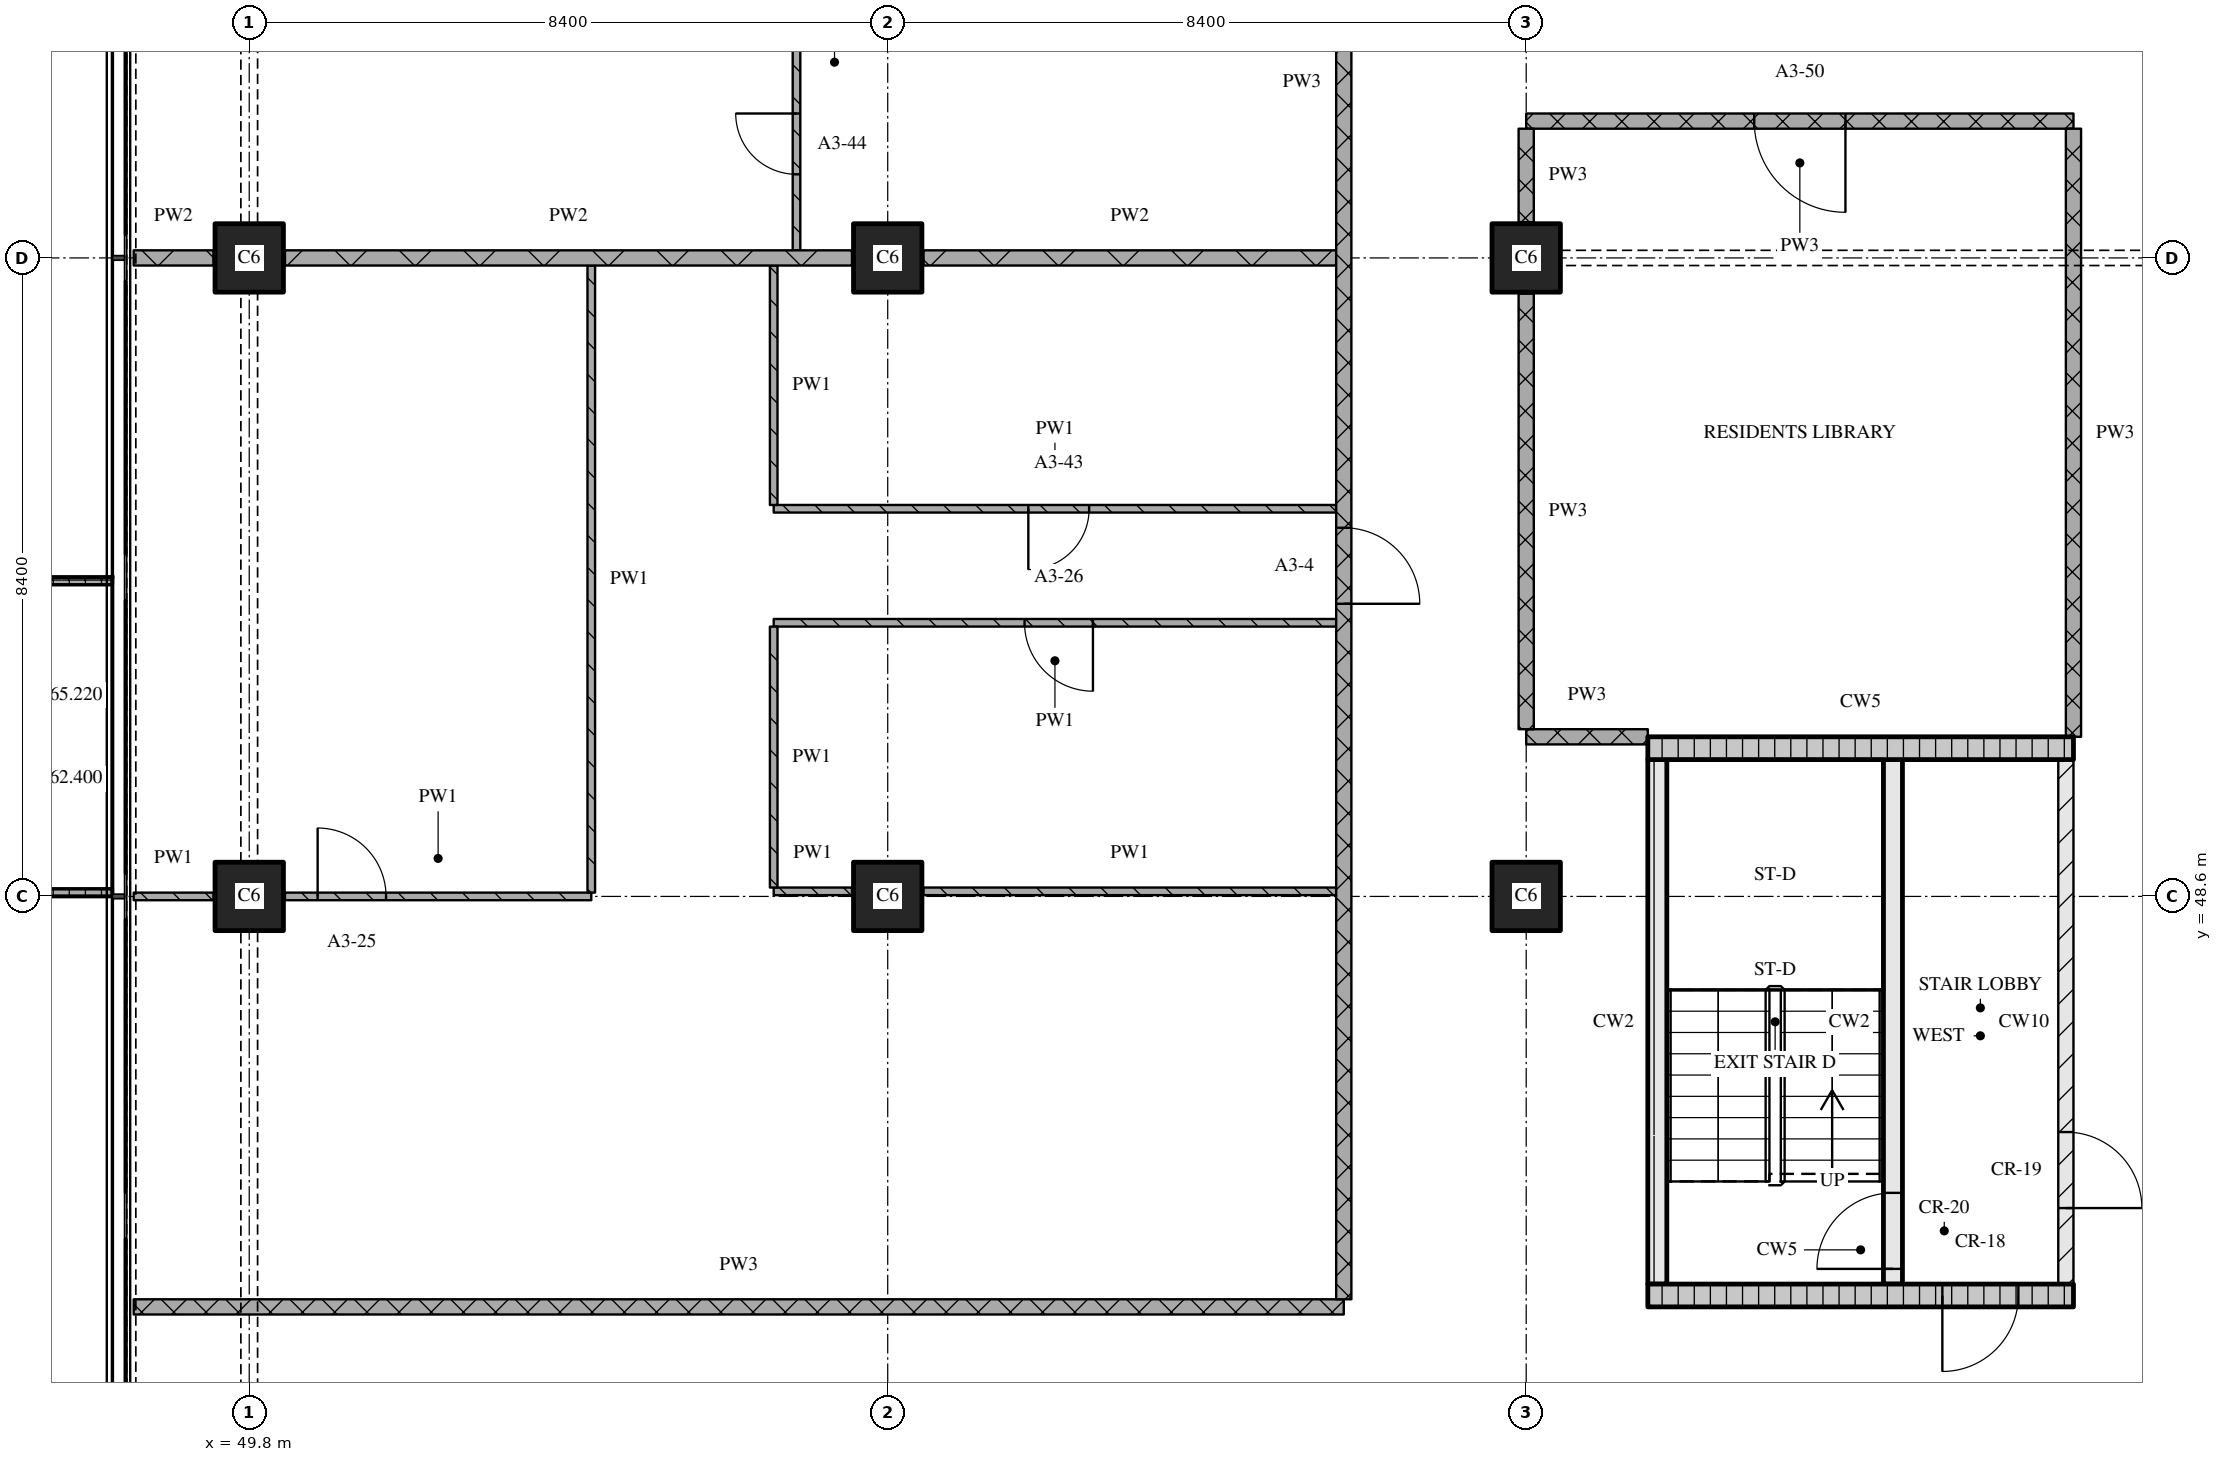
"""IFC4 building model, lengths in metres.
Left out: names, types, materials, properties, quantities, classifications, styles, units other than length and angle.
Written with IfcOpenShell. Run it as: python <this file> out.ifc"""

import sys

from ifc_helpers import new_model, si_unit, direction, frame, frame_2d, origin, origin_2d, place, context, subcontext, project, spatial, polyline, rectangle, outline, extrude, element, fill, save


model = new_model("IFC4")
c1 = context("Model", 3, precision=1e-05, world=origin(), true_north=direction((0.0, 1.0)))
c2 = subcontext(c1, "Body", "Model", "MODEL_VIEW")
j1 = project(units=[si_unit("LENGTHUNIT", "METRE"), si_unit("PLANEANGLEUNIT", "RADIAN")], contexts=[c1])
p1 = place(None, origin())
s1 = spatial("IfcSite", under=j1, at=p1, CompositionType="ELEMENT")
p2 = place(p1, origin())
s2 = spatial("IfcBuilding", under=s1, at=p2, CompositionType="ELEMENT")
p3 = place(p2, frame((0.0, 0.0, 62.4)))
s3 = spatial("IfcBuildingStorey", under=s2, at=p3, CompositionType="ELEMENT", Elevation=62.4)
for number, where, z_axis, x_axis in (
    (1, (49.8, 48.6, 0.0), (0.0, 0.0, 1.0), (1.0, 0.0, 0.0)),
    (2, (49.8, 57.0, 0.0), (0.0, 0.0, 1.0), (1.0, 0.0, 0.0)),
    (3, (58.2, 48.6, 0.0), (0.0, 0.0, 1.0), (1.0, 0.0, 0.0)),
    (4, (58.2, 57.0, 0.0), (0.0, 0.0, 1.0), (1.0, 0.0, 0.0)),
    (5, (66.6, 48.6, 0.0), (0.0, 0.0, 1.0), (1.0, 0.0, 0.0)),
    (6, (66.6, 57.0, 0.0), (0.0, 0.0, 1.0), (1.0, 0.0, 0.0)),
):
    element("IfcColumn", number, at=place(p3, frame(where, z_axis=z_axis, x_axis=x_axis)), inside=s3, PredefinedType="COLUMN", context=c2, shape_type="SweptSolid", body=[
        extrude(rectangle(XDim=0.9, YDim=0.9, at=origin_2d()), origin(), (0.0, 0.0, 1.0), 3.6),
    ])
p4 = place(p3, origin())
e7 = element("IfcWall", 7, at=p4, inside=s3, PredefinedType="SOLIDWALL", context=c2, shape_type="SweptSolid", body=[
    extrude(outline(polyline([(48.0, 52.8), (48.0, 52.7), (46.367, 52.7), (46.367, 48.7), (48.0, 48.7), (48.0, 48.6), (46.267, 48.6), (46.267, 52.8), (48.0, 52.8)])), origin(), (0.0, 0.0, 1.0), 1.0),
])
p5 = place(p3, frame((68.2, 43.35, 0.0), z_axis=(0.0, 0.0, 1.0), x_axis=(1.0, 0.0, 0.0)))
e8 = element("IfcWall", 8, at=p5, inside=s3, PredefinedType="SOLIDWALL", context=c2, shape_type="SweptSolid", body=[
    extrude(rectangle(XDim=5.6, YDim=0.3, at=frame_2d((2.8, 0.0))), origin(), (0.0, 0.0, 1.0), 3.32),
])
p6 = place(p5, frame((3.875, 0.0, 0.0)))
e9 = element("IfcOpeningElement", 9, at=p6, cuts=e8, PredefinedType="OPENING", context=c2, shape_type="SweptSolid", body=[
    extrude(rectangle(XDim=1.0, YDim=2.1, at=frame_2d((0.5, 1.05))), frame((0.0, 0.16, 0.0), z_axis=(0.0, -1.0, 0.0), x_axis=(1.0, 0.0, 0.0)), (0.0, 0.0, 1.0), 0.32),
])
p7 = place(p3, frame((68.325, 43.5, 0.0), z_axis=(0.0, 0.0, 1.0), x_axis=(0.0, 1.0, 0.0)))
e10 = element("IfcWall", 10, at=p7, inside=s3, PredefinedType="SOLIDWALL", context=c2, shape_type="SweptSolid", body=[
    extrude(rectangle(XDim=6.9, YDim=0.25, at=frame_2d((3.45, 0.0))), origin(), (0.0, 0.0, 1.0), 3.32),
])
p8 = place(p3, frame((71.425, 43.5, 0.0), z_axis=(0.0, 0.0, 1.0), x_axis=(0.0, 1.0, 0.0)))
e11 = element("IfcWall", 11, at=p8, inside=s3, PredefinedType="SOLIDWALL", context=c2, shape_type="SweptSolid", body=[
    extrude(rectangle(XDim=6.9, YDim=0.25, at=frame_2d((3.45, 0.0))), origin(), (0.0, 0.0, 1.0), 3.32),
])
p9 = place(p8, frame((0.2, 0.0, 0.0)))
e12 = element("IfcOpeningElement", 12, at=p9, cuts=e11, PredefinedType="OPENING", context=c2, shape_type="SweptSolid", body=[
    extrude(rectangle(XDim=1.0, YDim=2.1, at=frame_2d((0.5, 1.05))), frame((0.0, 0.135, 0.0), z_axis=(0.0, -1.0, 0.0), x_axis=(1.0, 0.0, 0.0)), (0.0, 0.0, 1.0), 0.27),
])
p10 = place(p3, frame((73.7, 43.5, 0.0), z_axis=(0.0, 0.0, 1.0), x_axis=(0.0, 1.0, 0.0)))
e13 = element("IfcWall", 13, at=p10, inside=s3, PredefinedType="PARTITIONING", context=c2, shape_type="SweptSolid", body=[
    extrude(rectangle(XDim=6.9, YDim=0.2, at=frame_2d((3.45, 0.0))), origin(), (0.0, 0.0, 1.0), 3.32),
])
p11 = place(p10, frame((1.0, 0.0, 0.0)))
e14 = element("IfcOpeningElement", 14, at=p11, cuts=e13, PredefinedType="OPENING", context=c2, shape_type="SweptSolid", body=[
    extrude(rectangle(XDim=1.0, YDim=2.1, at=frame_2d((0.5, 1.05))), frame((0.0, 0.11, 0.0), z_axis=(0.0, -1.0, 0.0), x_axis=(1.0, 0.0, 0.0)), (0.0, 0.0, 1.0), 0.22),
])
p12 = place(p3, frame((68.2, 50.55, 0.0), z_axis=(0.0, 0.0, 1.0), x_axis=(1.0, 0.0, 0.0)))
e15 = element("IfcWall", 15, at=p12, inside=s3, PredefinedType="SOLIDWALL", context=c2, shape_type="SweptSolid", body=[
    extrude(rectangle(XDim=5.6, YDim=0.3, at=frame_2d((2.8, 0.0))), origin(), (0.0, 0.0, 1.0), 3.32),
])
p13 = place(p3, frame((48.28, 43.2, 0.0), z_axis=(0.0, 0.0, 1.0), x_axis=(1.0, 0.0, 0.0)))
e16 = element("IfcWall", 16, at=p13, inside=s3, PredefinedType="PARTITIONING", context=c2, shape_type="SweptSolid", body=[
    extrude(rectangle(XDim=15.92, YDim=0.2, at=frame_2d((7.96, 0.0))), origin(), (0.0, 0.0, 1.0), 3.32),
])
p14 = place(p3, frame((48.28, 48.6, 0.0), z_axis=(0.0, 0.0, 1.0), x_axis=(1.0, 0.0, 0.0)))
e17 = element("IfcWall", 17, at=p14, inside=s3, PredefinedType="PARTITIONING", context=c2, shape_type="SweptSolid", body=[
    extrude(rectangle(XDim=1.05, YDim=0.1, at=frame_2d((0.525, 0.0))), origin(), (0.0, 0.0, 1.0), 3.32),
])
p15 = place(p3, frame((50.27, 48.6, 0.0), z_axis=(0.0, 0.0, 1.0), x_axis=(1.0, 0.0, 0.0)))
e18 = element("IfcWall", 18, at=p15, inside=s3, PredefinedType="PARTITIONING", context=c2, shape_type="SweptSolid", body=[
    extrude(rectangle(XDim=4.03, YDim=0.1, at=frame_2d((2.015, 0.0))), origin(), (0.0, 0.0, 1.0), 3.32),
])
p16 = place(p15, frame((0.43, 0.0, 0.0)))
e19 = element("IfcOpeningElement", 19, at=p16, cuts=e18, PredefinedType="OPENING", context=c2, shape_type="SweptSolid", body=[
    extrude(rectangle(XDim=0.9, YDim=2.1, at=frame_2d((0.45, 1.05))), frame((0.0, 0.06, 0.0), z_axis=(0.0, -1.0, 0.0), x_axis=(1.0, 0.0, 0.0)), (0.0, 0.0, 1.0), 0.12),
])
p17 = place(p3, frame((56.7, 48.667, 0.0), z_axis=(0.0, 0.0, 1.0), x_axis=(1.0, 0.0, 0.0)))
e20 = element("IfcWall", 20, at=p17, inside=s3, PredefinedType="PARTITIONING", context=c2, shape_type="SweptSolid", body=[
    extrude(rectangle(XDim=1.03, YDim=0.1, at=frame_2d((0.515, 0.0))), origin(), (0.0, 0.0, 1.0), 3.32),
])
p18 = place(p3, frame((58.67, 48.667, 0.0), z_axis=(0.0, 0.0, 1.0), x_axis=(1.0, 0.0, 0.0)))
e21 = element("IfcWall", 21, at=p18, inside=s3, PredefinedType="PARTITIONING", context=c2, shape_type="SweptSolid", body=[
    extrude(rectangle(XDim=5.43, YDim=0.1, at=frame_2d((2.715, 0.0))), origin(), (0.0, 0.0, 1.0), 3.32),
])
p19 = place(p3, frame((66.6, 50.7, 0.0), z_axis=(0.0, 0.0, 1.0), x_axis=(1.0, 0.0, 0.0)))
e22 = element("IfcWall", 22, at=p19, inside=s3, PredefinedType="PARTITIONING", context=c2, shape_type="SweptSolid", body=[
    extrude(rectangle(XDim=1.6, YDim=0.2, at=frame_2d((0.8, 0.0))), origin(), (0.0, 0.0, 1.0), 3.32),
])
p20 = place(p3, frame((64.1, 52.2, 0.0), z_axis=(0.0, 0.0, 1.0), x_axis=(-1.0, 0.0, 0.0)))
e23 = element("IfcWall", 23, at=p20, inside=s3, PredefinedType="PARTITIONING", context=c2, shape_type="SweptSolid", body=[
    extrude(rectangle(XDim=7.4, YDim=0.1, at=frame_2d((3.7, 0.0))), origin(), (0.0, 0.0, 1.0), 3.32),
])
p21 = place(p20, frame((3.2, 0.0, 0.0)))
e24 = element("IfcOpeningElement", 24, at=p21, cuts=e23, PredefinedType="OPENING", context=c2, shape_type="SweptSolid", body=[
    extrude(rectangle(XDim=0.9, YDim=2.1, at=frame_2d((0.45, 1.05))), frame((0.0, 0.06, 0.0), z_axis=(0.0, -1.0, 0.0), x_axis=(1.0, 0.0, 0.0)), (0.0, 0.0, 1.0), 0.12),
])
p22 = place(p3, frame((56.7, 53.7, 0.0), z_axis=(0.0, 0.0, 1.0), x_axis=(1.0, 0.0, 0.0)))
e25 = element("IfcWall", 25, at=p22, inside=s3, PredefinedType="PARTITIONING", context=c2, shape_type="SweptSolid", body=[
    extrude(rectangle(XDim=7.4, YDim=0.1, at=frame_2d((3.7, 0.0))), origin(), (0.0, 0.0, 1.0), 3.32),
])
p23 = place(p22, frame((3.35, 0.0, 0.0)))
e26 = element("IfcOpeningElement", 26, at=p23, cuts=e25, PredefinedType="OPENING", context=c2, shape_type="SweptSolid", body=[
    extrude(rectangle(XDim=0.8, YDim=2.1, at=frame_2d((0.4, 1.05))), frame((0.0, 0.06, 0.0), z_axis=(0.0, -1.0, 0.0), x_axis=(1.0, 0.0, 0.0)), (0.0, 0.0, 1.0), 0.12),
])
p24 = place(p3, frame((48.28, 57.0, 0.0), z_axis=(0.0, 0.0, 1.0), x_axis=(1.0, 0.0, 0.0)))
e27 = element("IfcWall", 27, at=p24, inside=s3, PredefinedType="PARTITIONING", context=c2, shape_type="SweptSolid", body=[
    extrude(rectangle(XDim=1.05, YDim=0.2, at=frame_2d((0.525, 0.0))), origin(), (0.0, 0.0, 1.0), 3.32),
])
p25 = place(p3, frame((50.27, 57.0, 0.0), z_axis=(0.0, 0.0, 1.0), x_axis=(1.0, 0.0, 0.0)))
e28 = element("IfcWall", 28, at=p25, inside=s3, PredefinedType="PARTITIONING", context=c2, shape_type="SweptSolid", body=[
    extrude(rectangle(XDim=7.46, YDim=0.2, at=frame_2d((3.73, 0.0))), origin(), (0.0, 0.0, 1.0), 3.32),
])
p26 = place(p3, frame((58.67, 57.0, 0.0), z_axis=(0.0, 0.0, 1.0), x_axis=(1.0, 0.0, 0.0)))
e29 = element("IfcWall", 29, at=p26, inside=s3, PredefinedType="PARTITIONING", context=c2, shape_type="SweptSolid", body=[
    extrude(rectangle(XDim=5.43, YDim=0.2, at=frame_2d((2.715, 0.0))), origin(), (0.0, 0.0, 1.0), 3.32),
])
p27 = place(p3, frame((73.8, 58.8, 0.0), z_axis=(0.0, 0.0, 1.0), x_axis=(-1.0, 0.0, 0.0)))
e30 = element("IfcWall", 30, at=p27, inside=s3, PredefinedType="PARTITIONING", context=c2, shape_type="SweptSolid", body=[
    extrude(rectangle(XDim=7.2, YDim=0.2, at=frame_2d((3.6, 0.0))), origin(), (0.0, 0.0, 1.0), 3.32),
])
p28 = place(p27, frame((3.0, 0.0, 0.0)))
e31 = element("IfcOpeningElement", 31, at=p28, cuts=e30, PredefinedType="OPENING", context=c2, shape_type="SweptSolid", body=[
    extrude(rectangle(XDim=1.2, YDim=2.1, at=frame_2d((0.6, 1.05))), frame((0.0, 0.11, 0.0), z_axis=(0.0, -1.0, 0.0), x_axis=(1.0, 0.0, 0.0)), (0.0, 0.0, 1.0), 0.22),
])
p29 = place(p3, frame((54.3, 56.9, 0.0), z_axis=(0.0, 0.0, 1.0), x_axis=(0.0, -1.0, 0.0)))
e32 = element("IfcWall", 32, at=p29, inside=s3, PredefinedType="PARTITIONING", context=c2, shape_type="SweptSolid", body=[
    extrude(rectangle(XDim=8.25, YDim=0.1, at=frame_2d((4.125, 0.0))), origin(), (0.0, 0.0, 1.0), 3.32),
])
p30 = place(p3, frame((56.7, 52.15, 0.0), z_axis=(0.0, 0.0, 1.0), x_axis=(0.0, -1.0, 0.0)))
e33 = element("IfcWall", 33, at=p30, inside=s3, PredefinedType="PARTITIONING", context=c2, shape_type="SweptSolid", body=[
    extrude(rectangle(XDim=3.433, YDim=0.1, at=frame_2d((1.717, 0.0))), origin(), (0.0, 0.0, 1.0), 3.32),
])
p31 = place(p3, frame((56.7, 56.9, 0.0), z_axis=(0.0, 0.0, 1.0), x_axis=(0.0, -1.0, 0.0)))
e34 = element("IfcWall", 34, at=p31, inside=s3, PredefinedType="PARTITIONING", context=c2, shape_type="SweptSolid", body=[
    extrude(rectangle(XDim=3.15, YDim=0.1, at=frame_2d((1.575, 0.0))), origin(), (0.0, 0.0, 1.0), 3.32),
])
p32 = place(p3, frame((57.0, 62.05, 0.0), z_axis=(0.0, 0.0, 1.0), x_axis=(0.0, -1.0, 0.0)))
e35 = element("IfcWall", 35, at=p32, inside=s3, PredefinedType="PARTITIONING", context=c2, shape_type="SweptSolid", body=[
    extrude(rectangle(XDim=4.95, YDim=0.1, at=frame_2d((2.475, 0.0))), origin(), (0.0, 0.0, 1.0), 3.32),
])
p33 = place(p32, frame((3.15, 0.0, 0.0)))
e36 = element("IfcOpeningElement", 36, at=p33, cuts=e35, PredefinedType="OPENING", context=c2, shape_type="SweptSolid", body=[
    extrude(rectangle(XDim=0.8, YDim=2.1, at=frame_2d((0.4, 1.05))), frame((0.0, 0.06, 0.0), z_axis=(0.0, -1.0, 0.0), x_axis=(1.0, 0.0, 0.0)), (0.0, 0.0, 1.0), 0.12),
])
p34 = place(p3, frame((64.2, 43.3, 0.0), z_axis=(0.0, 0.0, 1.0), x_axis=(0.0, 1.0, 0.0)))
e37 = element("IfcWall", 37, at=p34, inside=s3, PredefinedType="PARTITIONING", context=c2, shape_type="SweptSolid", body=[
    extrude(rectangle(XDim=32.02, YDim=0.2, at=frame_2d((16.01, 0.0))), origin(), (0.0, 0.0, 1.0), 3.32),
])
p35 = place(p34, frame((9.15, 0.0, 0.0)))
e38 = element("IfcOpeningElement", 38, at=p35, cuts=e37, PredefinedType="OPENING", context=c2, shape_type="SweptSolid", body=[
    extrude(rectangle(XDim=1.0, YDim=2.1, at=frame_2d((0.5, 1.05))), frame((0.0, 0.11, 0.0), z_axis=(0.0, -1.0, 0.0), x_axis=(1.0, 0.0, 0.0)), (0.0, 0.0, 1.0), 0.22),
])
p36 = place(p34, frame((19.05, 0.0, 0.0)))
e39 = element("IfcOpeningElement", 39, at=p36, cuts=e37, PredefinedType="OPENING", context=c2, shape_type="SweptSolid", body=[
    extrude(rectangle(XDim=1.0, YDim=2.1, at=frame_2d((0.5, 1.05))), frame((0.0, 0.11, 0.0), z_axis=(0.0, -1.0, 0.0), x_axis=(1.0, 0.0, 0.0)), (0.0, 0.0, 1.0), 0.22),
])
p37 = place(p3, frame((66.6, 56.53, 0.0), z_axis=(0.0, 0.0, 1.0), x_axis=(0.0, -1.0, 0.0)))
e40 = element("IfcWall", 40, at=p37, inside=s3, PredefinedType="PARTITIONING", context=c2, shape_type="SweptSolid", body=[
    extrude(rectangle(XDim=5.73, YDim=0.2, at=frame_2d((2.865, 0.0))), origin(), (0.0, 0.0, 1.0), 3.32),
])
p38 = place(p3, frame((66.6, 58.7, 0.0), z_axis=(0.0, 0.0, 1.0), x_axis=(0.0, -1.0, 0.0)))
e41 = element("IfcWall", 41, at=p38, inside=s3, PredefinedType="PARTITIONING", context=c2, shape_type="SweptSolid", body=[
    extrude(rectangle(XDim=1.23, YDim=0.2, at=frame_2d((0.615, 0.0))), origin(), (0.0, 0.0, 1.0), 3.32),
])
p39 = place(p3, frame((73.8, 58.7, 0.0), z_axis=(0.0, 0.0, 1.0), x_axis=(0.0, -1.0, 0.0)))
e42 = element("IfcWall", 42, at=p39, inside=s3, PredefinedType="PARTITIONING", context=c2, shape_type="SweptSolid", body=[
    extrude(rectangle(XDim=8.0, YDim=0.2, at=frame_2d((4.0, 0.0))), origin(), (0.0, 0.0, 1.0), 3.32),
])
p40 = place(p6, origin())
e43 = element("IfcDoor", 43, at=p40, inside=s3, OperationType="SINGLE_SWING_RIGHT", PredefinedType="DOOR", context=c2, shape_type="SweptSolid", body=[
    extrude(rectangle(XDim=1.0, YDim=2.1, at=frame_2d((0.5, 1.05))), frame((0.0, 0.025, 0.0), z_axis=(0.0, -1.0, 0.0), x_axis=(1.0, 0.0, 0.0)), (0.0, 0.0, 1.0), 0.05),
])
fill(e9, e43)
p41 = place(p9, origin())
e44 = element("IfcDoor", 44, at=p41, inside=s3, OperationType="SINGLE_SWING_LEFT", PredefinedType="DOOR", context=c2, shape_type="SweptSolid", body=[
    extrude(rectangle(XDim=1.0, YDim=2.1, at=frame_2d((0.5, 1.05))), frame((0.0, 0.025, 0.0), z_axis=(0.0, -1.0, 0.0), x_axis=(1.0, 0.0, 0.0)), (0.0, 0.0, 1.0), 0.05),
])
fill(e12, e44)
p42 = place(p11, origin())
e45 = element("IfcDoor", 45, at=p42, inside=s3, OperationType="SINGLE_SWING_RIGHT", PredefinedType="DOOR", context=c2, shape_type="SweptSolid", body=[
    extrude(rectangle(XDim=1.0, YDim=2.1, at=frame_2d((0.5, 1.05))), frame((0.0, 0.025, 0.0), z_axis=(0.0, -1.0, 0.0), x_axis=(1.0, 0.0, 0.0)), (0.0, 0.0, 1.0), 0.05),
])
fill(e14, e45)
p43 = place(p16, origin())
e46 = element("IfcDoor", 46, at=p43, inside=s3, OperationType="SINGLE_SWING_LEFT", PredefinedType="DOOR", context=c2, shape_type="SweptSolid", body=[
    extrude(rectangle(XDim=0.9, YDim=2.1, at=frame_2d((0.45, 1.05))), frame((0.0, 0.025, 0.0), z_axis=(0.0, -1.0, 0.0), x_axis=(1.0, 0.0, 0.0)), (0.0, 0.0, 1.0), 0.05),
])
fill(e19, e46)
p44 = place(p21, origin())
e47 = element("IfcDoor", 47, at=p44, inside=s3, OperationType="SINGLE_SWING_LEFT", PredefinedType="DOOR", context=c2, shape_type="SweptSolid", body=[
    extrude(rectangle(XDim=0.9, YDim=2.1, at=frame_2d((0.45, 1.05))), frame((0.0, 0.025, 0.0), z_axis=(0.0, -1.0, 0.0), x_axis=(1.0, 0.0, 0.0)), (0.0, 0.0, 1.0), 0.05),
])
fill(e24, e47)
p45 = place(p23, origin())
e48 = element("IfcDoor", 48, at=p45, inside=s3, OperationType="SINGLE_SWING_RIGHT", PredefinedType="DOOR", context=c2, shape_type="SweptSolid", body=[
    extrude(rectangle(XDim=0.8, YDim=2.1, at=frame_2d((0.4, 1.05))), frame((0.0, 0.025, 0.0), z_axis=(0.0, -1.0, 0.0), x_axis=(1.0, 0.0, 0.0)), (0.0, 0.0, 1.0), 0.05),
])
fill(e26, e48)
p46 = place(p28, origin())
e49 = element("IfcDoor", 49, at=p46, inside=s3, OperationType="SINGLE_SWING_LEFT", PredefinedType="DOOR", context=c2, shape_type="SweptSolid", body=[
    extrude(rectangle(XDim=1.2, YDim=2.1, at=frame_2d((0.6, 1.05))), frame((0.0, 0.025, 0.0), z_axis=(0.0, -1.0, 0.0), x_axis=(1.0, 0.0, 0.0)), (0.0, 0.0, 1.0), 0.05),
])
fill(e31, e49)
p47 = place(p33, origin())
e50 = element("IfcDoor", 50, at=p47, inside=s3, OperationType="SINGLE_SWING_RIGHT", PredefinedType="DOOR", context=c2, shape_type="SweptSolid", body=[
    extrude(rectangle(XDim=0.8, YDim=2.1, at=frame_2d((0.4, 1.05))), frame((0.0, 0.025, 0.0), z_axis=(0.0, -1.0, 0.0), x_axis=(1.0, 0.0, 0.0)), (0.0, 0.0, 1.0), 0.05),
])
fill(e36, e50)
p48 = place(p35, origin())
e51 = element("IfcDoor", 51, at=p48, inside=s3, OperationType="SINGLE_SWING_RIGHT", PredefinedType="DOOR", context=c2, shape_type="SweptSolid", body=[
    extrude(rectangle(XDim=1.0, YDim=2.1, at=frame_2d((0.5, 1.05))), frame((0.0, 0.025, 0.0), z_axis=(0.0, -1.0, 0.0), x_axis=(1.0, 0.0, 0.0)), (0.0, 0.0, 1.0), 0.05),
])
fill(e38, e51)
save(model, sys.argv[1])
